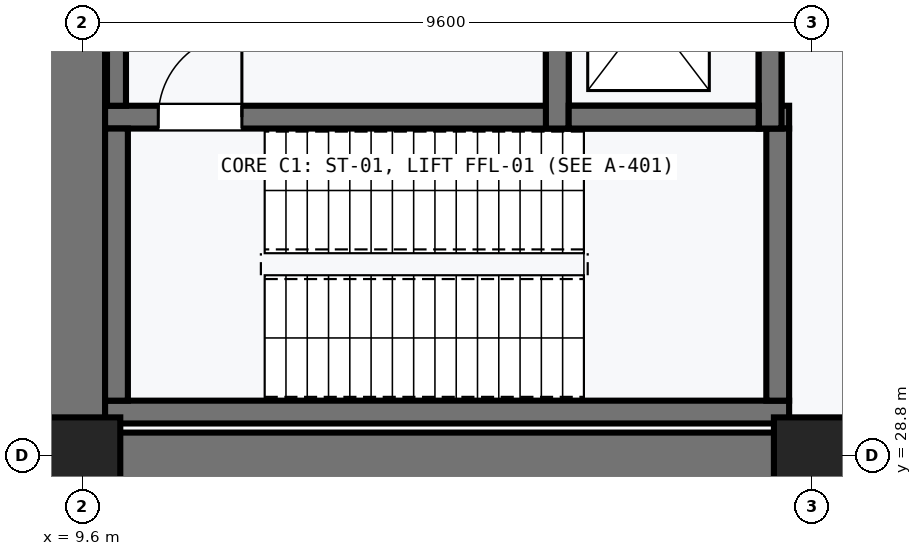
"""IFC4 building model, lengths in metres.
Left out: names, types, materials, properties, quantities, classifications, styles, units other than length and angle.
Written with IfcOpenShell. Run it as: python <this file> out.ifc"""

import sys

from ifc_helpers import new_model, si_unit, direction, frame, frame_2d, origin, origin_2d, place, context, subcontext, project, spatial, rectangle, extrude, element, fill, save


model = new_model("IFC4")
c1 = context("Model", 3, precision=1e-05, world=origin(), true_north=direction((0.0, 1.0)))
c2 = subcontext(c1, "Body", "Model", "MODEL_VIEW")
j1 = project(units=[si_unit("LENGTHUNIT", "METRE"), si_unit("PLANEANGLEUNIT", "RADIAN")], contexts=[c1])
p1 = place(None, origin())
s1 = spatial("IfcSite", under=j1, at=p1, CompositionType="ELEMENT")
p2 = place(p1, origin())
s2 = spatial("IfcBuilding", under=s1, at=p2, CompositionType="ELEMENT")
p3 = place(p2, frame((0.0, 0.0, -10.8)))
s3 = spatial("IfcBuildingStorey", under=s2, at=p3, CompositionType="ELEMENT", Elevation=-10.8)
p4 = place(p3, frame((28.9, 28.7, 0.0), z_axis=(0.0, 0.0, 1.0), x_axis=(-1.0, 0.0, 0.0)))
e1 = element("IfcWall", 1, at=p4, inside=s3, PredefinedType="SOLIDWALL", context=c2, shape_type="SweptSolid", body=[
    extrude(rectangle(XDim=19.4, YDim=0.8, at=frame_2d((9.7, 0.0))), origin(), (0.0, 0.0, 1.0), 5.05),
])
p5 = place(p3, frame((9.5, 28.7, 0.0), z_axis=(0.0, 0.0, 1.0), x_axis=(0.0, 1.0, 0.0)))
e2 = element("IfcWall", 2, at=p5, inside=s3, PredefinedType="SOLIDWALL", context=c2, shape_type="SweptSolid", body=[
    extrude(rectangle(XDim=19.4, YDim=0.8, at=frame_2d((9.7, 0.0))), origin(), (0.0, 0.0, 1.0), 5.05),
])
for number, where, z_axis, x_axis in (
    (3, (9.6, 28.8, 0.0), (0.0, 0.0, 1.0), (1.0, 0.0, 0.0)),
    (4, (19.2, 28.8, 0.0), (0.0, 0.0, 1.0), (1.0, 0.0, 0.0)),
):
    element("IfcColumn", number, at=place(p3, frame(where, z_axis=z_axis, x_axis=x_axis)), inside=s3, PredefinedType="COLUMN", context=c2, shape_type="SweptSolid", body=[
        extrude(rectangle(XDim=1.0, YDim=1.0, at=origin_2d()), origin(), (0.0, 0.0, 1.0), 5.05),
    ])
p6 = place(p3, frame((9.9, 29.37, 0.0), z_axis=(0.0, 0.0, 1.0), x_axis=(1.0, 0.0, 0.0)))
e5 = element("IfcWall", 5, at=p6, inside=s3, PredefinedType="SHEAR", context=c2, shape_type="SweptSolid", body=[
    extrude(rectangle(XDim=9.0, YDim=0.3, at=frame_2d((4.5, 0.0))), origin(), (0.0, 0.0, 1.0), 5.05),
])
p7 = place(p3, frame((18.9, 33.25, 0.0), z_axis=(0.0, 0.0, 1.0), x_axis=(-1.0, 0.0, 0.0)))
e6 = element("IfcWall", 6, at=p7, inside=s3, PredefinedType="SHEAR", context=c2, shape_type="SweptSolid", body=[
    extrude(rectangle(XDim=9.0, YDim=0.3, at=frame_2d((4.5, 0.0))), origin(), (0.0, 0.0, 1.0), 5.05),
])
p8 = place(p7, frame((7.2, 0.0, 0.0)))
e7 = element("IfcOpeningElement", 7, at=p8, cuts=e6, PredefinedType="OPENING", context=c2, shape_type="SweptSolid", body=[
    extrude(rectangle(XDim=1.1, YDim=2.15, at=frame_2d((0.55, 1.075))), frame((0.0, 0.16, 0.0), z_axis=(0.0, -1.0, 0.0), x_axis=(1.0, 0.0, 0.0)), (0.0, 0.0, 1.0), 0.32),
])
for number, where, z_axis, x_axis in (
    (8, (10.05, 29.52, 0.0), (0.0, 0.0, 1.0), (0.0, 1.0, 0.0)),
    (9, (18.75, 33.1, 0.0), (0.0, 0.0, 1.0), (0.0, -1.0, 0.0)),
):
    element("IfcWall", number, at=place(p3, frame(where, z_axis=z_axis, x_axis=x_axis)), inside=s3, PredefinedType="SHEAR", context=c2, shape_type="SweptSolid", body=[
        extrude(rectangle(XDim=3.58, YDim=0.3, at=frame_2d((1.79, 0.0))), origin(), (0.0, 0.0, 1.0), 5.05),
    ])
p9 = place(p3, frame((15.85, 36.1, 0.0), z_axis=(0.0, 0.0, 1.0), x_axis=(0.0, -1.0, 0.0)))
e10 = element("IfcWall", 10, at=p9, inside=s3, PredefinedType="SHEAR", context=c2, shape_type="SweptSolid", body=[
    extrude(rectangle(XDim=2.7, YDim=0.3, at=frame_2d((1.35, 0.0))), origin(), (0.0, 0.0, 1.0), 5.05),
])
p10 = place(p9, frame((0.8, 0.0, 0.0)))
e11 = element("IfcOpeningElement", 11, at=p10, cuts=e10, PredefinedType="OPENING", context=c2, shape_type="SweptSolid", body=[
    extrude(rectangle(XDim=1.1, YDim=2.1, at=frame_2d((0.55, 1.05))), frame((0.0, 0.16, 0.0), z_axis=(0.0, -1.0, 0.0), x_axis=(1.0, 0.0, 0.0)), (0.0, 0.0, 1.0), 0.32),
])
p11 = place(p3, frame((18.65, 33.4, 0.0), z_axis=(0.0, 0.0, 1.0), x_axis=(0.0, 1.0, 0.0)))
e12 = element("IfcWall", 12, at=p11, inside=s3, PredefinedType="SHEAR", context=c2, shape_type="SweptSolid", body=[
    extrude(rectangle(XDim=2.7, YDim=0.3, at=frame_2d((1.35, 0.0))), origin(), (0.0, 0.0, 1.0), 5.05),
])
p12 = place(p3, frame((10.05, 33.4, 0.0), z_axis=(0.0, 0.0, 1.0), x_axis=(0.0, 1.0, 0.0)))
e13 = element("IfcWall", 13, at=p12, inside=s3, PredefinedType="SHEAR", context=c2, shape_type="SweptSolid", body=[
    extrude(rectangle(XDim=2.7, YDim=0.25, at=frame_2d((1.35, 0.0))), origin(), (0.0, 0.0, 1.0), 5.05),
])
for number, where, z_axis, x_axis in (
    (14, (15.85, 33.1, -1.2), (0.0, 0.0, 1.0), (0.0, 1.0, 0.0)),
    (15, (18.65, 33.1, -1.2), (0.0, 0.0, 1.0), (0.0, 1.0, 0.0)),
):
    element("IfcWall", number, at=place(p3, frame(where, z_axis=z_axis, x_axis=x_axis)), inside=s3, PredefinedType="SHEAR", context=c2, shape_type="SweptSolid", body=[
        extrude(rectangle(XDim=3.3, YDim=0.3, at=frame_2d((1.65, 0.0))), origin(), (0.0, 0.0, 1.0), 0.32),
    ])
p13 = place(p3, frame((16.0, 33.25, -1.2), z_axis=(0.0, 0.0, 1.0), x_axis=(1.0, 0.0, 0.0)))
e16 = element("IfcWall", 16, at=p13, inside=s3, PredefinedType="SHEAR", context=c2, shape_type="SweptSolid", body=[
    extrude(rectangle(XDim=2.5, YDim=0.3, at=frame_2d((1.25, 0.0))), origin(), (0.0, 0.0, 1.0), 0.32),
])
p14 = place(p8, frame((1.1, 0.0, 0.0), z_axis=(0.0, 0.0, 1.0), x_axis=(-1.0, 0.0, 0.0)))
e17 = element("IfcDoor", 17, at=p14, inside=s3, OperationType="SINGLE_SWING_LEFT", PredefinedType="DOOR", context=c2, shape_type="SweptSolid", body=[
    extrude(rectangle(XDim=1.1, YDim=2.15, at=frame_2d((0.55, 1.075))), frame((0.0, 0.025, 0.0), z_axis=(0.0, -1.0, 0.0), x_axis=(1.0, 0.0, 0.0)), (0.0, 0.0, 1.0), 0.05),
])
fill(e7, e17)
save(model, sys.argv[1])
